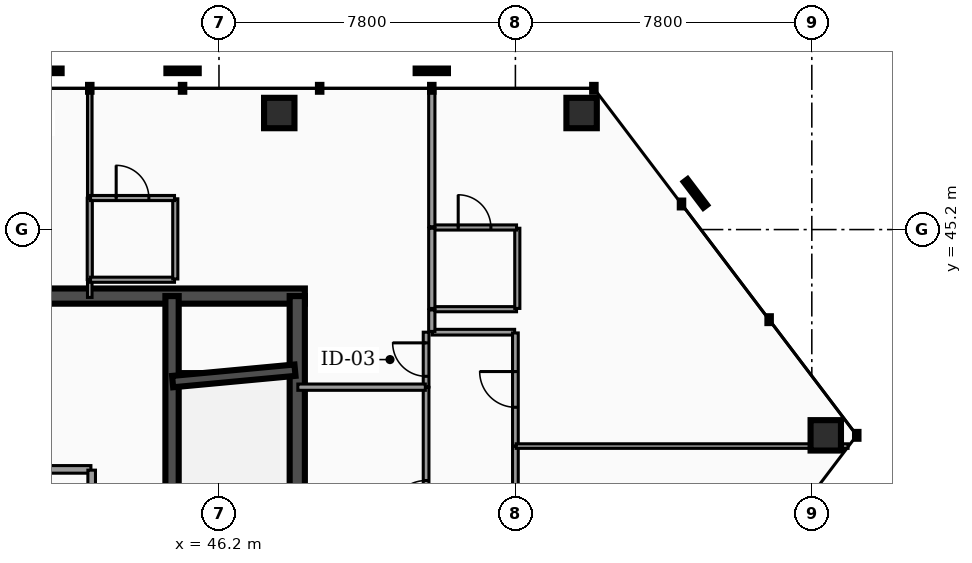
"""IFC4 building model, lengths in metres.
Left out: names, types, materials, properties, quantities, classifications, styles, units other than length and angle.
Written with IfcOpenShell. Run it as: python <this file> out.ifc"""

import sys

from ifc_helpers import new_model, si_unit, direction, frame, frame_2d, origin, origin_2d, place, context, subcontext, project, spatial, rectangle, hollow_rectangle, extrude, element, fill, save


model = new_model("IFC4")
c1 = context("Model", 3, precision=1e-05, world=origin(), true_north=direction((0.0, 1.0)))
c2 = subcontext(c1, "Body", "Model", "MODEL_VIEW")
j1 = project(units=[si_unit("LENGTHUNIT", "METRE"), si_unit("PLANEANGLEUNIT", "RADIAN")], contexts=[c1])
p1 = place(None, origin())
s1 = spatial("IfcSite", under=j1, at=p1, CompositionType="ELEMENT")
p2 = place(p1, origin())
s2 = spatial("IfcBuilding", under=s1, at=p2, CompositionType="ELEMENT")
p3 = place(p2, frame((0.0, 0.0, 157.08)))
s3 = spatial("IfcBuildingStorey", under=s2, at=p3, CompositionType="ELEMENT", Elevation=157.08)
p4 = place(p3, frame((28.4, 43.45, 0.0), z_axis=(0.0, 0.0, 1.0), x_axis=(1.0, 0.0, 0.0)))
e1 = element("IfcWall", 1, at=p4, inside=s3, PredefinedType="SHEAR", context=c2, shape_type="SweptSolid", body=[
    extrude(rectangle(XDim=20.06, YDim=0.4, at=frame_2d((10.03, 0.0))), origin(), (0.0, 0.0, 1.0), 3.5),
])
p5 = place(p3, frame((44.965, 33.25, 0.0), z_axis=(0.0, 0.0, 1.0), x_axis=(0.0, 1.0, 0.0)))
e2 = element("IfcWall", 2, at=p5, inside=s3, PredefinedType="SHEAR", context=c2, shape_type="SweptSolid", body=[
    extrude(rectangle(XDim=10.2, YDim=0.35, at=frame_2d((5.1, 0.0))), origin(), (0.0, 0.0, 1.0), 3.5),
])
p6 = place(p3, frame((48.26, 33.25, 0.0), z_axis=(0.0, 0.0, 1.0), x_axis=(0.0, 1.0, 0.0)))
e3 = element("IfcWall", 3, at=p6, inside=s3, PredefinedType="SHEAR", context=c2, shape_type="SweptSolid", body=[
    extrude(rectangle(XDim=10.2, YDim=0.4, at=frame_2d((5.1, 0.0))), origin(), (0.0, 0.0, 1.0), 3.5),
])
p7 = place(p3, frame((44.98, 41.2, 0.0), z_axis=(0.0, 0.0, 1.0), x_axis=(0.995686468965, 0.09278176286, 0.0)))
e4 = element("IfcWall", 4, at=p7, inside=s3, PredefinedType="SHEAR", context=c2, shape_type="SweptSolid", body=[
    extrude(rectangle(XDim=3.234, YDim=0.3, at=frame_2d((1.617, 0.0))), origin(), (0.0, 0.0, 1.0), 3.5),
])
for number, where, z_axis, x_axis in (
    (5, (55.742, 48.267, 0.0), (0.0, 0.0, 1.0), (1.0, 0.0, 0.0)),
    (6, (47.786, 48.267, 0.0), (0.0, 0.0, 1.0), (1.0, 0.0, 0.0)),
    (7, (62.167, 39.786, 0.0), (0.0, 0.0, 1.0), (1.0, 0.0, 0.0)),
):
    element("IfcColumn", number, at=place(p3, frame(where, z_axis=z_axis, x_axis=x_axis)), inside=s3, PredefinedType="COLUMN", context=c2, shape_type="SweptSolid", body=[
        extrude(hollow_rectangle(XDim=0.8, YDim=0.8, WallThickness=0.04, at=origin_2d()), origin(), (0.0, 0.0, 1.0), 3.5),
    ])
p8 = place(p3, frame((39.25, 38.89, 0.0), z_axis=(0.0, 0.0, 1.0), x_axis=(1.0, 0.0, 0.0)))
e8 = element("IfcWall", 8, at=p8, inside=s3, PredefinedType="PARTITIONING", context=c2, shape_type="SweptSolid", body=[
    extrude(rectangle(XDim=3.58, YDim=0.2, at=frame_2d((1.79, 0.0))), origin(), (0.0, 0.0, 1.0), 2.457),
])
p9 = place(p3, frame((42.85, 37.57, 0.0), z_axis=(0.0, 0.0, 1.0), x_axis=(0.0, 1.0, 0.0)))
e9 = element("IfcWall", 9, at=p9, inside=s3, PredefinedType="PARTITIONING", context=c2, shape_type="SweptSolid", body=[
    extrude(rectangle(XDim=1.3, YDim=0.2, at=frame_2d((0.65, 0.0))), origin(), (0.0, 0.0, 1.0), 2.457),
])
p10 = place(p3, frame((54.0, 33.25, 0.0), z_axis=(0.0, 0.0, 1.0), x_axis=(0.0, 1.0, 0.0)))
e10 = element("IfcWall", 10, at=p10, inside=s3, PredefinedType="PARTITIONING", context=c2, shape_type="SweptSolid", body=[
    extrude(rectangle(XDim=6.248, YDim=0.15, at=frame_2d((3.124, 0.0))), origin(), (0.0, 0.0, 1.0), 2.457),
])
p11 = place(p10, frame((2.654, 0.0, 0.0)))
e11 = element("IfcOpeningElement", 11, at=p11, cuts=e10, PredefinedType="OPENING", context=c2, shape_type="SweptSolid", body=[
    extrude(rectangle(XDim=0.94, YDim=2.05, at=frame_2d((0.47, 1.025))), frame((0.0, 0.085, 0.0), z_axis=(0.0, -1.0, 0.0), x_axis=(1.0, 0.0, 0.0)), (0.0, 0.0, 1.0), 0.17),
])
p12 = place(p3, frame((51.805, 42.5, 0.0), z_axis=(0.0, 0.0, 1.0), x_axis=(1.0, 0.0, 0.0)))
e12 = element("IfcWall", 12, at=p12, inside=s3, PredefinedType="PARTITIONING", context=c2, shape_type="SweptSolid", body=[
    extrude(rectangle(XDim=2.175, YDim=0.15, at=frame_2d((1.087, 0.0))), origin(), (0.0, 0.0, 1.0), 2.457),
])
p13 = place(p3, frame((54.0, 39.508, 0.0), z_axis=(0.0, 0.0, 1.0), x_axis=(0.0, 1.0, 0.0)))
e13 = element("IfcWall", 13, at=p13, inside=s3, PredefinedType="PARTITIONING", context=c2, shape_type="SweptSolid", body=[
    extrude(rectangle(XDim=2.972, YDim=0.15, at=frame_2d((1.486, 0.0))), origin(), (0.0, 0.0, 1.0), 2.457),
])
p14 = place(p13, frame((1.016, 0.0, 0.0)))
e14 = element("IfcOpeningElement", 14, at=p14, cuts=e13, PredefinedType="OPENING", context=c2, shape_type="SweptSolid", body=[
    extrude(rectangle(XDim=0.94, YDim=2.05, at=frame_2d((0.47, 1.025))), frame((0.0, 0.085, 0.0), z_axis=(0.0, -1.0, 0.0), x_axis=(1.0, 0.0, 0.0)), (0.0, 0.0, 1.0), 0.17),
])
p15 = place(p3, frame((51.65, 35.206, 0.0), z_axis=(0.0, 0.0, 1.0), x_axis=(0.0, 1.0, 0.0)))
e15 = element("IfcWall", 15, at=p15, inside=s3, PredefinedType="PARTITIONING", context=c2, shape_type="SweptSolid", body=[
    extrude(rectangle(XDim=5.843, YDim=0.15, at=frame_2d((2.921, 0.0))), origin(), (0.0, 0.0, 1.0), 2.457),
])
p16 = place(p15, frame((2.451, 0.0, 0.0)))
e16 = element("IfcOpeningElement", 16, at=p16, cuts=e15, PredefinedType="OPENING", context=c2, shape_type="SweptSolid", body=[
    extrude(rectangle(XDim=0.94, YDim=2.05, at=frame_2d((0.47, 1.025))), frame((0.0, 0.085, 0.0), z_axis=(0.0, -1.0, 0.0), x_axis=(1.0, 0.0, 0.0)), (0.0, 0.0, 1.0), 0.17),
])
p17 = place(p3, frame((51.65, 41.058, 0.0), z_axis=(0.0, 0.0, 1.0), x_axis=(0.0, 1.0, 0.0)))
e17 = element("IfcWall", 17, at=p17, inside=s3, PredefinedType="PARTITIONING", context=c2, shape_type="SweptSolid", body=[
    extrude(rectangle(XDim=1.442, YDim=0.15, at=frame_2d((0.721, 0.0))), origin(), (0.0, 0.0, 1.0), 2.457),
])
p18 = place(p17, frame((0.281, 0.0, 0.0)))
e18 = element("IfcOpeningElement", 18, at=p18, cuts=e17, PredefinedType="OPENING", context=c2, shape_type="SweptSolid", body=[
    extrude(rectangle(XDim=0.88, YDim=2.05, at=frame_2d((0.44, 1.025))), frame((0.0, 0.085, 0.0), z_axis=(0.0, -1.0, 0.0), x_axis=(1.0, 0.0, 0.0)), (0.0, 0.0, 1.0), 0.17),
])
p19 = place(p3, frame((42.8, 46.035, 0.0), z_axis=(0.0, 0.0, 1.0), x_axis=(0.0, 1.0, 0.0)))
e19 = element("IfcWall", 19, at=p19, inside=s3, PredefinedType="PARTITIONING", context=c2, shape_type="SweptSolid", body=[
    extrude(rectangle(XDim=2.867, YDim=0.12, at=frame_2d((1.433, 0.0))), origin(), (0.0, 0.0, 1.0), 2.457),
])
p20 = place(p3, frame((42.8, 43.415, 0.0), z_axis=(0.0, 0.0, 1.0), x_axis=(0.0, 1.0, 0.0)))
e20 = element("IfcWall", 20, at=p20, inside=s3, PredefinedType="PARTITIONING", context=c2, shape_type="SweptSolid", body=[
    extrude(rectangle(XDim=0.46, YDim=0.12, at=frame_2d((0.23, 0.0))), origin(), (0.0, 0.0, 1.0), 2.457),
])
p21 = place(p3, frame((42.8, 43.885, 0.0), z_axis=(0.0, 0.0, 1.0), x_axis=(0.0, 1.0, 0.0)))
e21 = element("IfcWall", 21, at=p21, inside=s3, PredefinedType="PARTITIONING", context=c2, shape_type="SweptSolid", body=[
    extrude(rectangle(XDim=2.14, YDim=0.135, at=frame_2d((1.07, 0.0))), origin(), (0.0, 0.0, 1.0), 2.457),
])
p22 = place(p3, frame((54.02, 39.503, 0.0), z_axis=(0.0, 0.0, 1.0), x_axis=(1.0, 0.0, 0.0)))
e22 = element("IfcWall", 22, at=p22, inside=s3, PredefinedType="PARTITIONING", context=c2, shape_type="SweptSolid", body=[
    extrude(rectangle(XDim=8.734, YDim=0.12, at=frame_2d((4.367, 0.0))), origin(), (0.0, 0.0, 1.0), 2.457),
])
p23 = place(p3, frame((51.82, 43.105, 0.0), z_axis=(0.0, 0.0, 1.0), x_axis=(1.0, 0.0, 0.0)))
e23 = element("IfcWall", 23, at=p23, inside=s3, PredefinedType="PARTITIONING", context=c2, shape_type="SweptSolid", body=[
    extrude(rectangle(XDim=2.21, YDim=0.135, at=frame_2d((1.105, 0.0))), origin(), (0.0, 0.0, 1.0), 2.457),
])
p24 = place(p3, frame((54.05, 43.125, 0.0), z_axis=(0.0, 0.0, 1.0), x_axis=(0.0, 1.0, 0.0)))
e24 = element("IfcWall", 24, at=p24, inside=s3, PredefinedType="PARTITIONING", context=c2, shape_type="SweptSolid", body=[
    extrude(rectangle(XDim=2.11, YDim=0.135, at=frame_2d((1.055, 0.0))), origin(), (0.0, 0.0, 1.0), 2.457),
])
p25 = place(p3, frame((51.82, 45.255, 0.0), z_axis=(0.0, 0.0, 1.0), x_axis=(1.0, 0.0, 0.0)))
e25 = element("IfcWall", 25, at=p25, inside=s3, PredefinedType="PARTITIONING", context=c2, shape_type="SweptSolid", body=[
    extrude(rectangle(XDim=2.21, YDim=0.135, at=frame_2d((1.105, 0.0))), origin(), (0.0, 0.0, 1.0), 2.457),
])
p26 = place(p25, frame((0.675, 0.0, 0.0)))
e26 = element("IfcOpeningElement", 26, at=p26, cuts=e25, PredefinedType="OPENING", context=c2, shape_type="SweptSolid", body=[
    extrude(rectangle(XDim=0.86, YDim=2.05, at=frame_2d((0.43, 1.025))), frame((0.0, 0.077, 0.0), z_axis=(0.0, -1.0, 0.0), x_axis=(1.0, 0.0, 0.0)), (0.0, 0.0, 1.0), 0.155),
])
p27 = place(p3, frame((51.8, 42.52, 0.0), z_axis=(0.0, 0.0, 1.0), x_axis=(0.0, 1.0, 0.0)))
e27 = element("IfcWall", 27, at=p27, inside=s3, PredefinedType="PARTITIONING", context=c2, shape_type="SweptSolid", body=[
    extrude(rectangle(XDim=0.565, YDim=0.165, at=frame_2d((0.282, 0.0))), origin(), (0.0, 0.0, 1.0), 2.457),
])
p28 = place(p3, frame((51.8, 45.275, 0.0), z_axis=(0.0, 0.0, 1.0), x_axis=(0.0, 1.0, 0.0)))
e28 = element("IfcWall", 28, at=p28, inside=s3, PredefinedType="PARTITIONING", context=c2, shape_type="SweptSolid", body=[
    extrude(rectangle(XDim=3.627, YDim=0.165, at=frame_2d((1.813, 0.0))), origin(), (0.0, 0.0, 1.0), 2.457),
])
p29 = place(p3, frame((51.8, 43.125, 0.0), z_axis=(0.0, 0.0, 1.0), x_axis=(0.0, 1.0, 0.0)))
e29 = element("IfcWall", 29, at=p29, inside=s3, PredefinedType="PARTITIONING", context=c2, shape_type="SweptSolid", body=[
    extrude(rectangle(XDim=2.11, YDim=0.165, at=frame_2d((1.055, 0.0))), origin(), (0.0, 0.0, 1.0), 2.457),
])
p30 = place(p3, frame((48.275, 41.053, 0.0), z_axis=(0.0, 0.0, 1.0), x_axis=(1.0, 0.0, 0.0)))
e30 = element("IfcWall", 30, at=p30, inside=s3, PredefinedType="PARTITIONING", context=c2, shape_type="SweptSolid", body=[
    extrude(rectangle(XDim=3.355, YDim=0.165, at=frame_2d((1.677, 0.0))), origin(), (0.0, 0.0, 1.0), 2.457),
])
p31 = place(p3, frame((42.82, 43.88, 0.0), z_axis=(0.0, 0.0, 1.0), x_axis=(1.0, 0.0, 0.0)))
e31 = element("IfcWall", 31, at=p31, inside=s3, PredefinedType="PARTITIONING", context=c2, shape_type="SweptSolid", body=[
    extrude(rectangle(XDim=2.21, YDim=0.135, at=frame_2d((1.105, 0.0))), origin(), (0.0, 0.0, 1.0), 2.457),
])
p32 = place(p3, frame((45.05, 43.9, 0.0), z_axis=(0.0, 0.0, 1.0), x_axis=(0.0, 1.0, 0.0)))
e32 = element("IfcWall", 32, at=p32, inside=s3, PredefinedType="PARTITIONING", context=c2, shape_type="SweptSolid", body=[
    extrude(rectangle(XDim=2.11, YDim=0.135, at=frame_2d((1.055, 0.0))), origin(), (0.0, 0.0, 1.0), 2.457),
])
p33 = place(p3, frame((42.82, 46.03, 0.0), z_axis=(0.0, 0.0, 1.0), x_axis=(1.0, 0.0, 0.0)))
e33 = element("IfcWall", 33, at=p33, inside=s3, PredefinedType="PARTITIONING", context=c2, shape_type="SweptSolid", body=[
    extrude(rectangle(XDim=2.21, YDim=0.135, at=frame_2d((1.105, 0.0))), origin(), (0.0, 0.0, 1.0), 2.457),
])
p34 = place(p33, frame((0.675, 0.0, 0.0)))
e34 = element("IfcOpeningElement", 34, at=p34, cuts=e33, PredefinedType="OPENING", context=c2, shape_type="SweptSolid", body=[
    extrude(rectangle(XDim=0.86, YDim=2.05, at=frame_2d((0.43, 1.025))), frame((0.0, 0.077, 0.0), z_axis=(0.0, -1.0, 0.0), x_axis=(1.0, 0.0, 0.0)), (0.0, 0.0, 1.0), 0.155),
])
p35 = place(p14, origin())
e35 = element("IfcDoor", 35, at=p35, inside=s3, OperationType="SINGLE_SWING_RIGHT", PredefinedType="DOOR", context=c2, shape_type="SweptSolid", body=[
    extrude(rectangle(XDim=0.94, YDim=2.05, at=frame_2d((0.47, 1.025))), frame((0.0, 0.025, 0.0), z_axis=(0.0, -1.0, 0.0), x_axis=(1.0, 0.0, 0.0)), (0.0, 0.0, 1.0), 0.05),
])
fill(e14, e35)
p36 = place(p16, origin())
e36 = element("IfcDoor", 36, at=p36, inside=s3, OperationType="SINGLE_SWING_LEFT", PredefinedType="DOOR", context=c2, shape_type="SweptSolid", body=[
    extrude(rectangle(XDim=0.94, YDim=2.05, at=frame_2d((0.47, 1.025))), frame((0.0, 0.025, 0.0), z_axis=(0.0, -1.0, 0.0), x_axis=(1.0, 0.0, 0.0)), (0.0, 0.0, 1.0), 0.05),
])
fill(e16, e36)
p37 = place(p18, origin())
e37 = element("IfcDoor", 37, at=p37, inside=s3, OperationType="SINGLE_SWING_RIGHT", PredefinedType="DOOR", context=c2, shape_type="SweptSolid", body=[
    extrude(rectangle(XDim=0.88, YDim=2.05, at=frame_2d((0.44, 1.025))), frame((0.0, 0.025, 0.0), z_axis=(0.0, -1.0, 0.0), x_axis=(1.0, 0.0, 0.0)), (0.0, 0.0, 1.0), 0.05),
])
fill(e18, e37)
p38 = place(p26, origin())
e38 = element("IfcDoor", 38, at=p38, inside=s3, OperationType="SINGLE_SWING_LEFT", PredefinedType="DOOR", context=c2, shape_type="SweptSolid", body=[
    extrude(rectangle(XDim=0.86, YDim=2.05, at=frame_2d((0.43, 1.025))), frame((0.0, 0.025, 0.0), z_axis=(0.0, -1.0, 0.0), x_axis=(1.0, 0.0, 0.0)), (0.0, 0.0, 1.0), 0.05),
])
fill(e26, e38)
p39 = place(p34, origin())
e39 = element("IfcDoor", 39, at=p39, inside=s3, OperationType="SINGLE_SWING_LEFT", PredefinedType="DOOR", context=c2, shape_type="SweptSolid", body=[
    extrude(rectangle(XDim=0.86, YDim=2.05, at=frame_2d((0.43, 1.025))), frame((0.0, 0.025, 0.0), z_axis=(0.0, -1.0, 0.0), x_axis=(1.0, 0.0, 0.0)), (0.0, 0.0, 1.0), 0.05),
])
fill(e34, e39)
save(model, sys.argv[1])
